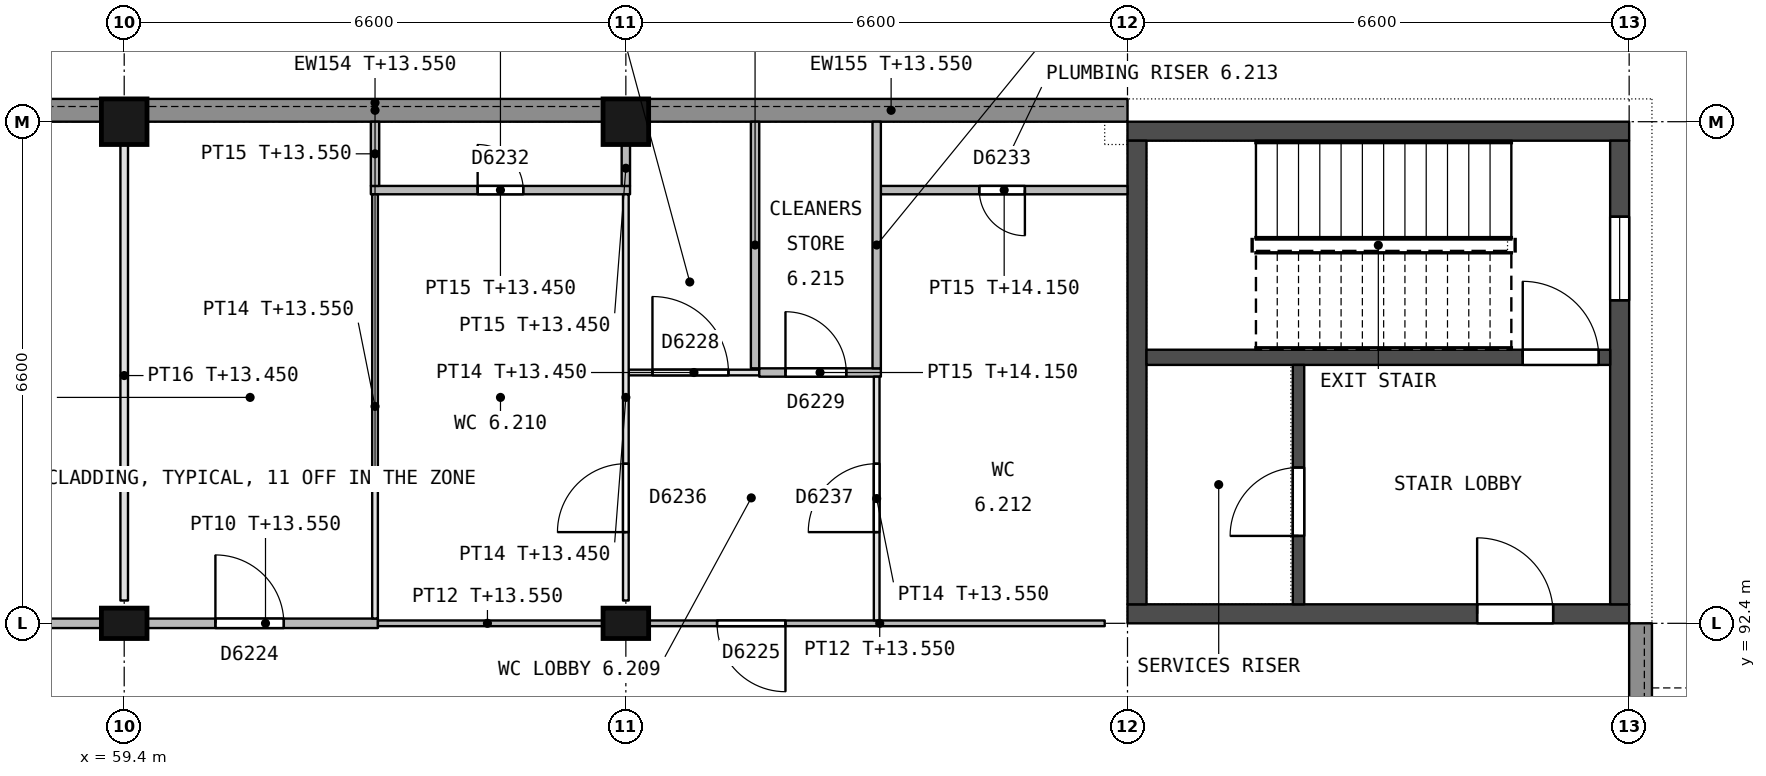
"""IFC4 building model, lengths in metres.
Left out: names, types, materials, properties, quantities, classifications, styles, units other than length and angle.
Written with IfcOpenShell. Run it as: python <this file> out.ifc"""

import sys

from ifc_helpers import new_model, si_unit, direction, frame, frame_2d, origin, origin_2d, place, context, subcontext, project, spatial, rectangle, extrude, element, fill, save


model = new_model("IFC4")
c1 = context("Model", 3, precision=1e-05, world=origin(), true_north=direction((0.0, 1.0)))
c2 = subcontext(c1, "Body", "Model", "MODEL_VIEW")
j1 = project(units=[si_unit("LENGTHUNIT", "METRE"), si_unit("PLANEANGLEUNIT", "RADIAN")], contexts=[c1])
p1 = place(None, origin())
s1 = spatial("IfcSite", under=j1, at=p1, CompositionType="ELEMENT")
p2 = place(p1, origin())
s2 = spatial("IfcBuilding", under=s1, at=p2, CompositionType="ELEMENT")
p3 = place(p2, frame((0.0, 0.0, 9.9)))
s3 = spatial("IfcBuildingStorey", under=s2, at=p3, CompositionType="ELEMENT", Elevation=9.9)
p4 = place(p3, frame((59.4, 92.4, 0.0), z_axis=(0.0, 0.0, 1.0), x_axis=(1.0, 0.0, 0.0)))
e1 = element("IfcColumn", 1, at=p4, inside=s3, PredefinedType="COLUMN", context=c2, shape_type="SweptSolid", body=[
    extrude(rectangle(XDim=0.6, YDim=0.4, at=origin_2d()), origin(), (0.0, 0.0, 1.0), 4.5),
])
p5 = place(p3, frame((59.4, 99.0, 0.0), z_axis=(0.0, 0.0, 1.0), x_axis=(1.0, 0.0, 0.0)))
e2 = element("IfcColumn", 2, at=p5, inside=s3, PredefinedType="COLUMN", context=c2, shape_type="SweptSolid", body=[
    extrude(rectangle(XDim=0.6, YDim=0.6, at=origin_2d()), origin(), (0.0, 0.0, 1.0), 4.5),
])
p6 = place(p3, frame((66.0, 92.4, 0.0), z_axis=(0.0, 0.0, 1.0), x_axis=(1.0, 0.0, 0.0)))
e3 = element("IfcColumn", 3, at=p6, inside=s3, PredefinedType="COLUMN", context=c2, shape_type="SweptSolid", body=[
    extrude(rectangle(XDim=0.6, YDim=0.4, at=origin_2d()), origin(), (0.0, 0.0, 1.0), 4.5),
])
p7 = place(p3, frame((66.0, 99.0, 0.0), z_axis=(0.0, 0.0, 1.0), x_axis=(1.0, 0.0, 0.0)))
e4 = element("IfcColumn", 4, at=p7, inside=s3, PredefinedType="COLUMN", context=c2, shape_type="SweptSolid", body=[
    extrude(rectangle(XDim=0.6, YDim=0.6, at=origin_2d()), origin(), (0.0, 0.0, 1.0), 4.5),
])
p8 = place(p3, frame((72.6, 92.525, 0.0), z_axis=(0.0, 0.0, 1.0), x_axis=(1.0, 0.0, 0.0)))
e5 = element("IfcWall", 5, at=p8, inside=s3, PredefinedType="SHEAR", context=c2, shape_type="SweptSolid", body=[
    extrude(rectangle(XDim=6.6, YDim=0.25, at=frame_2d((3.3, 0.0))), origin(), (0.0, 0.0, 1.0), 4.25),
])
p9 = place(p8, frame((4.6, 0.0, 0.0)))
e6 = element("IfcOpeningElement", 6, at=p9, cuts=e5, PredefinedType="OPENING", context=c2, shape_type="SweptSolid", body=[
    extrude(rectangle(XDim=1.0, YDim=2.1, at=frame_2d((0.5, 1.05))), frame((0.0, 0.135, 0.0), z_axis=(0.0, -1.0, 0.0), x_axis=(1.0, 0.0, 0.0)), (0.0, 0.0, 1.0), 0.27),
])
p10 = place(p3, frame((72.6, 98.875, 0.0), z_axis=(0.0, 0.0, 1.0), x_axis=(1.0, 0.0, 0.0)))
e7 = element("IfcWall", 7, at=p10, inside=s3, PredefinedType="SHEAR", context=c2, shape_type="SweptSolid", body=[
    extrude(rectangle(XDim=6.6, YDim=0.25, at=frame_2d((3.3, 0.0))), origin(), (0.0, 0.0, 1.0), 4.25),
])
p11 = place(p3, frame((79.075, 92.65, 0.0), z_axis=(0.0, 0.0, 1.0), x_axis=(0.0, 1.0, 0.0)))
e8 = element("IfcWall", 8, at=p11, inside=s3, PredefinedType="SHEAR", context=c2, shape_type="SweptSolid", body=[
    extrude(rectangle(XDim=6.1, YDim=0.25, at=frame_2d((3.05, 0.0))), origin(), (0.0, 0.0, 1.0), 4.25),
])
p12 = place(p11, frame((4.0, 0.0, 0.7)))
e9 = element("IfcOpeningElement", 9, at=p12, cuts=e8, PredefinedType="OPENING", context=c2, shape_type="SweptSolid", body=[
    extrude(rectangle(XDim=1.1, YDim=1.5, at=frame_2d((0.55, 0.75))), frame((0.0, 0.135, 0.0), z_axis=(0.0, -1.0, 0.0), x_axis=(1.0, 0.0, 0.0)), (0.0, 0.0, 1.0), 0.27),
])
p13 = place(p3, frame((72.725, 92.65, 0.0), z_axis=(0.0, 0.0, 1.0), x_axis=(0.0, 1.0, 0.0)))
e10 = element("IfcWall", 10, at=p13, inside=s3, PredefinedType="SHEAR", context=c2, shape_type="SweptSolid", body=[
    extrude(rectangle(XDim=6.1, YDim=0.25, at=frame_2d((3.05, 0.0))), origin(), (0.0, 0.0, 1.0), 4.25),
])
p14 = place(p3, frame((72.85, 95.9, 0.0), z_axis=(0.0, 0.0, 1.0), x_axis=(1.0, 0.0, 0.0)))
e11 = element("IfcWall", 11, at=p14, inside=s3, PredefinedType="SHEAR", context=c2, shape_type="SweptSolid", body=[
    extrude(rectangle(XDim=6.1, YDim=0.2, at=frame_2d((3.05, 0.0))), origin(), (0.0, 0.0, 1.0), 4.25),
])
p15 = place(p14, frame((4.95, 0.0, 0.0)))
e12 = element("IfcOpeningElement", 12, at=p15, cuts=e11, PredefinedType="OPENING", context=c2, shape_type="SweptSolid", body=[
    extrude(rectangle(XDim=1.0, YDim=2.1, at=frame_2d((0.5, 1.05))), frame((0.0, 0.11, 0.0), z_axis=(0.0, -1.0, 0.0), x_axis=(1.0, 0.0, 0.0)), (0.0, 0.0, 1.0), 0.22),
])
p16 = place(p3, frame((74.85, 92.65, 0.0), z_axis=(0.0, 0.0, 1.0), x_axis=(0.0, 1.0, 0.0)))
e13 = element("IfcWall", 13, at=p16, inside=s3, PredefinedType="SHEAR", context=c2, shape_type="SweptSolid", body=[
    extrude(rectangle(XDim=3.15, YDim=0.15, at=frame_2d((1.575, 0.0))), origin(), (0.0, 0.0, 1.0), 4.25),
])
p17 = place(p16, frame((0.9, 0.0, 0.0)))
e14 = element("IfcOpeningElement", 14, at=p17, cuts=e13, PredefinedType="OPENING", context=c2, shape_type="SweptSolid", body=[
    extrude(rectangle(XDim=0.9, YDim=2.1, at=frame_2d((0.45, 1.05))), frame((0.0, 0.085, 0.0), z_axis=(0.0, -1.0, 0.0), x_axis=(1.0, 0.0, 0.0)), (0.0, 0.0, 1.0), 0.17),
])
p18 = place(p3, frame((79.35, 92.4, 0.0), z_axis=(0.0, 0.0, 1.0), x_axis=(0.0, -1.0, 0.0)))
e15 = element("IfcWall", 15, at=p18, inside=s3, PredefinedType="STANDARD", context=c2, shape_type="SweptSolid", body=[
    extrude(rectangle(XDim=3.1, YDim=0.3, at=frame_2d((1.55, 0.0))), origin(), (0.0, 0.0, 1.0), 3.65),
])
p19 = place(p18, frame((1.05, 0.0, 1.1)))
e16 = element("IfcOpeningElement", 16, at=p19, cuts=e15, PredefinedType="OPENING", context=c2, shape_type="SweptSolid", body=[
    extrude(rectangle(XDim=1.2, YDim=1.2, at=frame_2d((0.6, 0.6))), frame((0.0, 0.16, 0.0), z_axis=(0.0, -1.0, 0.0), x_axis=(1.0, 0.0, 0.0)), (0.0, 0.0, 1.0), 0.32),
])
for number, where, z_axis, x_axis in (
    (17, (53.1, 99.15, 0.0), (0.0, 0.0, 1.0), (1.0, 0.0, 0.0)),
    (18, (59.7, 99.15, 0.0), (0.0, 0.0, 1.0), (1.0, 0.0, 0.0)),
):
    element("IfcWall", number, at=place(p3, frame(where, z_axis=z_axis, x_axis=x_axis)), inside=s3, PredefinedType="STANDARD", context=c2, shape_type="SweptSolid", body=[
        extrude(rectangle(XDim=6.0, YDim=0.3, at=frame_2d((3.0, 0.0))), origin(), (0.0, 0.0, 1.0), 3.65),
    ])
p20 = place(p3, frame((66.3, 99.15, 0.0), z_axis=(0.0, 0.0, 1.0), x_axis=(1.0, 0.0, 0.0)))
e19 = element("IfcWall", 19, at=p20, inside=s3, PredefinedType="STANDARD", context=c2, shape_type="SweptSolid", body=[
    extrude(rectangle(XDim=6.3, YDim=0.3, at=frame_2d((3.15, 0.0))), origin(), (0.0, 0.0, 1.0), 3.65),
])
p21 = place(p3, frame((53.1, 92.4, 0.0), z_axis=(0.0, 0.0, 1.0), x_axis=(1.0, 0.0, 0.0)))
e20 = element("IfcWall", 20, at=p21, inside=s3, PredefinedType="PARTITIONING", context=c2, shape_type="SweptSolid", body=[
    extrude(rectangle(XDim=6.0, YDim=0.125, at=frame_2d((3.0, 0.0))), origin(), (0.0, 0.0, 1.0), 3.65),
])
p22 = place(p3, frame((59.7, 92.4, 0.0), z_axis=(0.0, 0.0, 1.0), x_axis=(1.0, 0.0, 0.0)))
e21 = element("IfcWall", 21, at=p22, inside=s3, PredefinedType="PARTITIONING", context=c2, shape_type="SweptSolid", body=[
    extrude(rectangle(XDim=3.038, YDim=0.125, at=frame_2d((1.519, 0.0))), origin(), (0.0, 0.0, 1.0), 3.65),
])
p23 = place(p22, frame((0.9, 0.0, 0.0)))
e22 = element("IfcOpeningElement", 22, at=p23, cuts=e21, PredefinedType="OPENING", context=c2, shape_type="SweptSolid", body=[
    extrude(rectangle(XDim=0.9, YDim=2.1, at=frame_2d((0.45, 1.05))), frame((0.0, 0.073, 0.0), z_axis=(0.0, -1.0, 0.0), x_axis=(1.0, 0.0, 0.0)), (0.0, 0.0, 1.0), 0.145),
])
p24 = place(p3, frame((62.738, 92.4, 0.0), z_axis=(0.0, 0.0, 1.0), x_axis=(1.0, 0.0, 0.0)))
e23 = element("IfcWall", 23, at=p24, inside=s3, PredefinedType="PARTITIONING", context=c2, shape_type="SweptSolid", body=[
    extrude(rectangle(XDim=2.962, YDim=0.075, at=frame_2d((1.481, 0.0))), origin(), (0.0, 0.0, 1.0), 3.65),
])
p25 = place(p3, frame((66.3, 92.4, 0.0), z_axis=(0.0, 0.0, 1.0), x_axis=(1.0, 0.0, 0.0)))
e24 = element("IfcWall", 24, at=p25, inside=s3, PredefinedType="PARTITIONING", context=c2, shape_type="SweptSolid", body=[
    extrude(rectangle(XDim=6.0, YDim=0.075, at=frame_2d((3.0, 0.0))), origin(), (0.0, 0.0, 1.0), 3.65),
])
p26 = place(p25, frame((0.9, 0.0, 0.0)))
e25 = element("IfcOpeningElement", 25, at=p26, cuts=e24, PredefinedType="OPENING", context=c2, shape_type="SweptSolid", body=[
    extrude(rectangle(XDim=0.9, YDim=2.1, at=frame_2d((0.45, 1.05))), frame((0.0, 0.047, 0.0), z_axis=(0.0, -1.0, 0.0), x_axis=(1.0, 0.0, 0.0)), (0.0, 0.0, 1.0), 0.095),
])
p27 = place(p3, frame((67.755, 95.7, 0.0), z_axis=(0.0, 0.0, 1.0), x_axis=(-1.0, 0.0, 0.0)))
e26 = element("IfcWall", 26, at=p27, inside=s3, PredefinedType="PARTITIONING", context=c2, shape_type="SweptSolid", body=[
    extrude(rectangle(XDim=1.718, YDim=0.075, at=frame_2d((0.859, 0.0))), origin(), (0.0, 0.0, 1.0), 3.55),
])
p28 = place(p27, frame((0.405, 0.0, 0.0)))
e27 = element("IfcOpeningElement", 27, at=p28, cuts=e26, PredefinedType="OPENING", context=c2, shape_type="SweptSolid", body=[
    extrude(rectangle(XDim=1.0, YDim=2.1, at=frame_2d((0.5, 1.05))), frame((0.0, 0.047, 0.0), z_axis=(0.0, -1.0, 0.0), x_axis=(1.0, 0.0, 0.0)), (0.0, 0.0, 1.0), 0.095),
])
p29 = place(p3, frame((67.755, 95.7, 0.0), z_axis=(0.0, 0.0, 1.0), x_axis=(1.0, 0.0, 0.0)))
e28 = element("IfcWall", 28, at=p29, inside=s3, PredefinedType="PARTITIONING", context=c2, shape_type="SweptSolid", body=[
    extrude(rectangle(XDim=1.6, YDim=0.11, at=frame_2d((0.8, 0.0))), origin(), (0.0, 0.0, 1.0), 4.25),
])
p30 = place(p29, frame((0.345, 0.0, 0.0)))
e29 = element("IfcOpeningElement", 29, at=p30, cuts=e28, PredefinedType="OPENING", context=c2, shape_type="SweptSolid", body=[
    extrude(rectangle(XDim=0.8, YDim=2.1, at=frame_2d((0.4, 1.05))), frame((0.0, 0.065, 0.0), z_axis=(0.0, -1.0, 0.0), x_axis=(1.0, 0.0, 0.0)), (0.0, 0.0, 1.0), 0.13),
])
p31 = place(p3, frame((66.055, 98.1, 0.0), z_axis=(0.0, 0.0, 1.0), x_axis=(-1.0, 0.0, 0.0)))
e30 = element("IfcWall", 30, at=p31, inside=s3, PredefinedType="PARTITIONING", context=c2, shape_type="SweptSolid", body=[
    extrude(rectangle(XDim=3.41, YDim=0.11, at=frame_2d((1.705, 0.0))), origin(), (0.0, 0.0, 1.0), 3.55),
])
p32 = place(p31, frame((1.405, 0.0, 0.0)))
e31 = element("IfcOpeningElement", 31, at=p32, cuts=e30, PredefinedType="OPENING", context=c2, shape_type="SweptSolid", body=[
    extrude(rectangle(XDim=0.6, YDim=2.1, at=frame_2d((0.3, 1.05))), frame((0.0, 0.065, 0.0), z_axis=(0.0, -1.0, 0.0), x_axis=(1.0, 0.0, 0.0)), (0.0, 0.0, 1.0), 0.13),
])
p33 = place(p3, frame((72.6, 98.1, 0.0), z_axis=(0.0, 0.0, 1.0), x_axis=(-1.0, 0.0, 0.0)))
e32 = element("IfcWall", 32, at=p33, inside=s3, PredefinedType="PARTITIONING", context=c2, shape_type="SweptSolid", body=[
    extrude(rectangle(XDim=3.245, YDim=0.11, at=frame_2d((1.623, 0.0))), origin(), (0.0, 0.0, 1.0), 4.25),
])
p34 = place(p33, frame((1.35, 0.0, 0.0)))
e33 = element("IfcOpeningElement", 33, at=p34, cuts=e32, PredefinedType="OPENING", context=c2, shape_type="SweptSolid", body=[
    extrude(rectangle(XDim=0.6, YDim=2.1, at=frame_2d((0.3, 1.05))), frame((0.0, 0.065, 0.0), z_axis=(0.0, -1.0, 0.0), x_axis=(1.0, 0.0, 0.0)), (0.0, 0.0, 1.0), 0.13),
])
p35 = place(p3, frame((59.4, 92.7, 0.0), z_axis=(0.0, 0.0, 1.0), x_axis=(0.0, 1.0, 0.0)))
e34 = element("IfcWall", 34, at=p35, inside=s3, PredefinedType="PARTITIONING", context=c2, shape_type="SweptSolid", body=[
    extrude(rectangle(XDim=6.0, YDim=0.1, at=frame_2d((3.0, 0.0))), origin(), (0.0, 0.0, 1.0), 3.55),
])
p36 = place(p3, frame((62.7, 92.463, 0.0), z_axis=(0.0, 0.0, 1.0), x_axis=(0.0, 1.0, 0.0)))
e35 = element("IfcWall", 35, at=p36, inside=s3, PredefinedType="PARTITIONING", context=c2, shape_type="SweptSolid", body=[
    extrude(rectangle(XDim=5.582, YDim=0.075, at=frame_2d((2.791, 0.0))), origin(), (0.0, 0.0, 1.0), 3.65),
])
p37 = place(p3, frame((62.7, 98.155, 0.0), z_axis=(0.0, 0.0, 1.0), x_axis=(0.0, 1.0, 0.0)))
e36 = element("IfcWall", 36, at=p37, inside=s3, PredefinedType="PARTITIONING", context=c2, shape_type="SweptSolid", body=[
    extrude(rectangle(XDim=0.845, YDim=0.11, at=frame_2d((0.422, 0.0))), origin(), (0.0, 0.0, 1.0), 3.65),
])
p38 = place(p3, frame((66.0, 92.7, 0.0), z_axis=(0.0, 0.0, 1.0), x_axis=(0.0, 1.0, 0.0)))
e37 = element("IfcWall", 37, at=p38, inside=s3, PredefinedType="PARTITIONING", context=c2, shape_type="SweptSolid", body=[
    extrude(rectangle(XDim=5.345, YDim=0.075, at=frame_2d((2.672, 0.0))), origin(), (0.0, 0.0, 1.0), 3.55),
])
p39 = place(p38, frame((0.9, 0.0, 0.0)))
e38 = element("IfcOpeningElement", 38, at=p39, cuts=e37, PredefinedType="OPENING", context=c2, shape_type="SweptSolid", body=[
    extrude(rectangle(XDim=0.9, YDim=2.1, at=frame_2d((0.45, 1.05))), frame((0.0, 0.047, 0.0), z_axis=(0.0, -1.0, 0.0), x_axis=(1.0, 0.0, 0.0)), (0.0, 0.0, 1.0), 0.095),
])
p40 = place(p3, frame((66.0, 98.155, 0.0), z_axis=(0.0, 0.0, 1.0), x_axis=(0.0, 1.0, 0.0)))
e39 = element("IfcWall", 39, at=p40, inside=s3, PredefinedType="PARTITIONING", context=c2, shape_type="SweptSolid", body=[
    extrude(rectangle(XDim=0.545, YDim=0.11, at=frame_2d((0.272, 0.0))), origin(), (0.0, 0.0, 1.0), 3.55),
])
p41 = place(p3, frame((67.7, 95.755, 0.0), z_axis=(0.0, 0.0, 1.0), x_axis=(0.0, 1.0, 0.0)))
e40 = element("IfcWall", 40, at=p41, inside=s3, PredefinedType="PARTITIONING", context=c2, shape_type="SweptSolid", body=[
    extrude(rectangle(XDim=3.245, YDim=0.11, at=frame_2d((1.623, 0.0))), origin(), (0.0, 0.0, 1.0), 3.65),
])
p42 = place(p3, frame((69.3, 95.645, 0.0), z_axis=(0.0, 0.0, 1.0), x_axis=(0.0, -1.0, 0.0)))
e41 = element("IfcWall", 41, at=p42, inside=s3, PredefinedType="PARTITIONING", context=c2, shape_type="SweptSolid", body=[
    extrude(rectangle(XDim=3.207, YDim=0.075, at=frame_2d((1.604, 0.0))), origin(), (0.0, 0.0, 1.0), 3.65),
])
p43 = place(p42, frame((1.145, 0.0, 0.0)))
e42 = element("IfcOpeningElement", 42, at=p43, cuts=e41, PredefinedType="OPENING", context=c2, shape_type="SweptSolid", body=[
    extrude(rectangle(XDim=0.9, YDim=2.1, at=frame_2d((0.45, 1.05))), frame((0.0, 0.047, 0.0), z_axis=(0.0, -1.0, 0.0), x_axis=(1.0, 0.0, 0.0)), (0.0, 0.0, 1.0), 0.095),
])
p44 = place(p3, frame((69.3, 95.755, 0.0), z_axis=(0.0, 0.0, 1.0), x_axis=(0.0, 1.0, 0.0)))
e43 = element("IfcWall", 43, at=p44, inside=s3, PredefinedType="PARTITIONING", context=c2, shape_type="SweptSolid", body=[
    extrude(rectangle(XDim=3.245, YDim=0.11, at=frame_2d((1.623, 0.0))), origin(), (0.0, 0.0, 1.0), 3.65),
])
p45 = place(p17, origin())
e44 = element("IfcDoor", 44, at=p45, inside=s3, OperationType="SINGLE_SWING_LEFT", PredefinedType="DOOR", context=c2, shape_type="SweptSolid", body=[
    extrude(rectangle(XDim=0.9, YDim=2.1, at=frame_2d((0.45, 1.05))), frame((0.0, 0.025, 0.0), z_axis=(0.0, -1.0, 0.0), x_axis=(1.0, 0.0, 0.0)), (0.0, 0.0, 1.0), 0.05),
])
fill(e14, e44)
p46 = place(p9, origin())
e45 = element("IfcDoor", 45, at=p46, inside=s3, OperationType="SINGLE_SWING_LEFT", PredefinedType="DOOR", context=c2, shape_type="SweptSolid", body=[
    extrude(rectangle(XDim=1.0, YDim=2.1, at=frame_2d((0.5, 1.05))), frame((0.0, 0.025, 0.0), z_axis=(0.0, -1.0, 0.0), x_axis=(1.0, 0.0, 0.0)), (0.0, 0.0, 1.0), 0.05),
])
fill(e6, e45)
p47 = place(p15, origin())
e46 = element("IfcDoor", 46, at=p47, inside=s3, OperationType="SINGLE_SWING_LEFT", PredefinedType="DOOR", context=c2, shape_type="SweptSolid", body=[
    extrude(rectangle(XDim=1.0, YDim=2.1, at=frame_2d((0.5, 1.05))), frame((0.0, 0.025, 0.0), z_axis=(0.0, -1.0, 0.0), x_axis=(1.0, 0.0, 0.0)), (0.0, 0.0, 1.0), 0.05),
])
fill(e12, e46)
p48 = place(p12, origin())
e47 = element("IfcWindow", 47, at=p48, inside=s3, PartitioningType="SINGLE_PANEL", PredefinedType="WINDOW", context=c2, shape_type="SweptSolid", body=[
    extrude(rectangle(XDim=1.1, YDim=1.5, at=frame_2d((0.55, 0.75))), frame((0.0, 0.03, 0.0), z_axis=(0.0, -1.0, 0.0), x_axis=(1.0, 0.0, 0.0)), (0.0, 0.0, 1.0), 0.06),
])
fill(e9, e47)
p49 = place(p23, origin())
e48 = element("IfcDoor", 48, at=p49, inside=s3, OperationType="SINGLE_SWING_LEFT", PredefinedType="DOOR", context=c2, shape_type="SweptSolid", body=[
    extrude(rectangle(XDim=0.9, YDim=2.1, at=frame_2d((0.45, 1.05))), frame((0.0, 0.025, 0.0), z_axis=(0.0, -1.0, 0.0), x_axis=(1.0, 0.0, 0.0)), (0.0, 0.0, 1.0), 0.05),
])
fill(e22, e48)
p50 = place(p26, origin())
e49 = element("IfcDoor", 49, at=p50, inside=s3, OperationType="SINGLE_SWING_RIGHT", PredefinedType="DOOR", context=c2, shape_type="SweptSolid", body=[
    extrude(rectangle(XDim=0.9, YDim=2.1, at=frame_2d((0.45, 1.05))), frame((0.0, 0.025, 0.0), z_axis=(0.0, -1.0, 0.0), x_axis=(1.0, 0.0, 0.0)), (0.0, 0.0, 1.0), 0.05),
])
fill(e25, e49)
p51 = place(p28, origin())
e50 = element("IfcDoor", 50, at=p51, inside=s3, OperationType="SINGLE_SWING_RIGHT", PredefinedType="DOOR", context=c2, shape_type="SweptSolid", body=[
    extrude(rectangle(XDim=1.0, YDim=2.1, at=frame_2d((0.5, 1.05))), frame((0.0, 0.025, 0.0), z_axis=(0.0, -1.0, 0.0), x_axis=(1.0, 0.0, 0.0)), (0.0, 0.0, 1.0), 0.05),
])
fill(e27, e50)
p52 = place(p30, origin())
e51 = element("IfcDoor", 51, at=p52, inside=s3, OperationType="SINGLE_SWING_LEFT", PredefinedType="DOOR", context=c2, shape_type="SweptSolid", body=[
    extrude(rectangle(XDim=0.8, YDim=2.1, at=frame_2d((0.4, 1.05))), frame((0.0, 0.025, 0.0), z_axis=(0.0, -1.0, 0.0), x_axis=(1.0, 0.0, 0.0)), (0.0, 0.0, 1.0), 0.05),
])
fill(e29, e51)
p53 = place(p32, origin())
e52 = element("IfcDoor", 52, at=p53, inside=s3, OperationType="SINGLE_SWING_RIGHT", PredefinedType="DOOR", context=c2, shape_type="SweptSolid", body=[
    extrude(rectangle(XDim=0.6, YDim=2.1, at=frame_2d((0.3, 1.05))), frame((0.0, 0.025, 0.0), z_axis=(0.0, -1.0, 0.0), x_axis=(1.0, 0.0, 0.0)), (0.0, 0.0, 1.0), 0.05),
])
fill(e31, e52)
p54 = place(p34, origin())
e53 = element("IfcDoor", 53, at=p54, inside=s3, OperationType="SINGLE_SWING_LEFT", PredefinedType="DOOR", context=c2, shape_type="SweptSolid", body=[
    extrude(rectangle(XDim=0.6, YDim=2.1, at=frame_2d((0.3, 1.05))), frame((0.0, 0.025, 0.0), z_axis=(0.0, -1.0, 0.0), x_axis=(1.0, 0.0, 0.0)), (0.0, 0.0, 1.0), 0.05),
])
fill(e33, e53)
p55 = place(p39, origin())
e54 = element("IfcDoor", 54, at=p55, inside=s3, OperationType="SINGLE_SWING_LEFT", PredefinedType="DOOR", context=c2, shape_type="SweptSolid", body=[
    extrude(rectangle(XDim=0.9, YDim=2.1, at=frame_2d((0.45, 1.05))), frame((0.0, 0.025, 0.0), z_axis=(0.0, -1.0, 0.0), x_axis=(1.0, 0.0, 0.0)), (0.0, 0.0, 1.0), 0.05),
])
fill(e38, e54)
p56 = place(p43, origin())
e55 = element("IfcDoor", 55, at=p56, inside=s3, OperationType="SINGLE_SWING_RIGHT", PredefinedType="DOOR", context=c2, shape_type="SweptSolid", body=[
    extrude(rectangle(XDim=0.9, YDim=2.1, at=frame_2d((0.45, 1.05))), frame((0.0, 0.025, 0.0), z_axis=(0.0, -1.0, 0.0), x_axis=(1.0, 0.0, 0.0)), (0.0, 0.0, 1.0), 0.05),
])
fill(e42, e55)
save(model, sys.argv[1])
